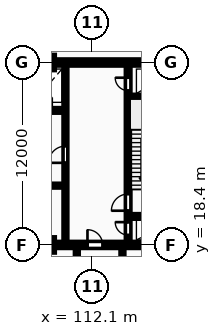
"""IFC4 building model, lengths in metres.
Left out: names, types, materials, properties, quantities, classifications, styles, units other than length and angle.
Written with IfcOpenShell. Run it as: python <this file> out.ifc"""

import sys

from ifc_helpers import new_model, si_unit, direction, frame, frame_2d, origin, origin_2d, place, context, subcontext, project, spatial, rectangle, extrude, element, fill, save


model = new_model("IFC4")
c1 = context("Model", 3, precision=1e-05, world=origin(), true_north=direction((0.0, 1.0)))
c2 = subcontext(c1, "Body", "Model", "MODEL_VIEW")
j1 = project(units=[si_unit("LENGTHUNIT", "METRE"), si_unit("PLANEANGLEUNIT", "RADIAN")], contexts=[c1])
p1 = place(None, origin())
s1 = spatial("IfcSite", under=j1, at=p1, CompositionType="ELEMENT")
p2 = place(p1, origin())
s2 = spatial("IfcBuilding", under=s1, at=p2, CompositionType="ELEMENT")
p3 = place(p2, origin())
s3 = spatial("IfcBuildingStorey", under=s2, at=p3, CompositionType="ELEMENT", Elevation=0.0)
for number, where, z_axis, x_axis in (
    (1, (109.1, 18.4, 0.0), (0.0, 0.0, 1.0), (1.0, 0.0, 0.0)),
    (2, (109.1, 30.4, 0.0), (0.0, 0.0, 1.0), (1.0, 0.0, 0.0)),
):
    element("IfcColumn", number, at=place(p3, frame(where, z_axis=z_axis, x_axis=x_axis)), inside=s3, PredefinedType="COLUMN", context=c2, shape_type="SweptSolid", body=[
        extrude(rectangle(XDim=1.05, YDim=0.95, at=origin_2d()), origin(), (0.0, 0.0, 1.0), 5.4),
    ])
p4 = place(p3, frame((81.925, 30.4, 0.0), z_axis=(0.0, 0.0, 1.0), x_axis=(1.0, 0.0, 0.0)))
e3 = element("IfcWall", 3, at=p4, inside=s3, PredefinedType="SHEAR", context=c2, shape_type="SweptSolid", body=[
    extrude(rectangle(XDim=36.265, YDim=0.35, at=frame_2d((18.132, 0.0))), origin(), (0.0, 0.0, 1.0), 5.4),
])
p5 = place(p3, frame((81.925, 18.4, 0.0), z_axis=(0.0, 0.0, 1.0), x_axis=(1.0, 0.0, 0.0)))
e4 = element("IfcWall", 4, at=p5, inside=s3, PredefinedType="SHEAR", context=c2, shape_type="SweptSolid", body=[
    extrude(rectangle(XDim=36.265, YDim=0.35, at=frame_2d((18.132, 0.0))), origin(), (0.0, 0.0, 1.0), 5.4),
])
p6 = place(p5, frame((5.675, 0.0, 0.0)))
e5 = element("IfcOpeningElement", 5, at=p6, cuts=e4, PredefinedType="OPENING", context=c2, shape_type="SweptSolid", body=[
    extrude(rectangle(XDim=1.0, YDim=2.15, at=frame_2d((0.5, 1.075))), frame((0.0, 0.185, 0.0), z_axis=(0.0, -1.0, 0.0), x_axis=(1.0, 0.0, 0.0)), (0.0, 0.0, 1.0), 0.37),
])
p7 = place(p5, frame((21.925, 0.0, 0.0)))
e6 = element("IfcOpeningElement", 6, at=p7, cuts=e4, PredefinedType="OPENING", context=c2, shape_type="SweptSolid", body=[
    extrude(rectangle(XDim=1.5, YDim=2.2, at=frame_2d((0.75, 1.1))), frame((0.0, 0.185, 0.0), z_axis=(0.0, -1.0, 0.0), x_axis=(1.0, 0.0, 0.0)), (0.0, 0.0, 1.0), 0.37),
])
p8 = place(p5, frame((29.875, 0.0, 0.0)))
e7 = element("IfcOpeningElement", 7, at=p8, cuts=e4, PredefinedType="OPENING", context=c2, shape_type="SweptSolid", body=[
    extrude(rectangle(XDim=1.0, YDim=2.15, at=frame_2d((0.5, 1.075))), frame((0.0, 0.185, 0.0), z_axis=(0.0, -1.0, 0.0), x_axis=(1.0, 0.0, 0.0)), (0.0, 0.0, 1.0), 0.37),
])
p9 = place(p3, frame((99.68, 27.25, 0.0), z_axis=(0.0, 0.0, 1.0), x_axis=(1.0, 0.0, 0.0)))
e8 = element("IfcWall", 8, at=p9, inside=s3, PredefinedType="SHEAR", context=c2, shape_type="SweptSolid", body=[
    extrude(rectangle(XDim=10.54, YDim=0.25, at=frame_2d((5.27, 0.0))), origin(), (0.0, 0.0, 1.0), 5.4),
])
p10 = place(p9, frame((0.76, 0.0, 0.0)))
e9 = element("IfcOpeningElement", 9, at=p10, cuts=e8, PredefinedType="OPENING", context=c2, shape_type="SweptSolid", body=[
    extrude(rectangle(XDim=1.12, YDim=2.12, at=frame_2d((0.56, 1.06))), frame((0.0, 0.135, 0.0), z_axis=(0.0, -1.0, 0.0), x_axis=(1.0, 0.0, 0.0)), (0.0, 0.0, 1.0), 0.27),
])
p11 = place(p9, frame((3.56, 0.0, 0.0)))
e10 = element("IfcOpeningElement", 10, at=p11, cuts=e8, PredefinedType="OPENING", context=c2, shape_type="SweptSolid", body=[
    extrude(rectangle(XDim=1.12, YDim=2.12, at=frame_2d((0.56, 1.06))), frame((0.0, 0.135, 0.0), z_axis=(0.0, -1.0, 0.0), x_axis=(1.0, 0.0, 0.0)), (0.0, 0.0, 1.0), 0.27),
])
p12 = place(p9, frame((6.36, 0.0, 0.0)))
e11 = element("IfcOpeningElement", 11, at=p12, cuts=e8, PredefinedType="OPENING", context=c2, shape_type="SweptSolid", body=[
    extrude(rectangle(XDim=1.12, YDim=2.12, at=frame_2d((0.56, 1.06))), frame((0.0, 0.135, 0.0), z_axis=(0.0, -1.0, 0.0), x_axis=(1.0, 0.0, 0.0)), (0.0, 0.0, 1.0), 0.27),
])
p13 = place(p9, frame((8.92, 0.0, 0.0)))
e12 = element("IfcOpeningElement", 12, at=p13, cuts=e8, PredefinedType="OPENING", context=c2, shape_type="SweptSolid", body=[
    extrude(rectangle(XDim=0.85, YDim=2.05, at=frame_2d((0.425, 1.025))), frame((0.0, 0.135, 0.0), z_axis=(0.0, -1.0, 0.0), x_axis=(1.0, 0.0, 0.0)), (0.0, 0.0, 1.0), 0.27),
])
p14 = place(p3, frame((91.08, 22.3, 0.0), z_axis=(0.0, 0.0, 1.0), x_axis=(1.0, 0.0, 0.0)))
e13 = element("IfcWall", 13, at=p14, inside=s3, PredefinedType="PARTITIONING", context=c2, shape_type="SweptSolid", body=[
    extrude(rectangle(XDim=19.14, YDim=0.2, at=frame_2d((9.57, 0.0))), origin(), (0.0, 0.0, 1.0), 5.1),
])
p15 = place(p14, frame((1.15, 0.0, 0.0)))
e14 = element("IfcOpeningElement", 14, at=p15, cuts=e13, PredefinedType="OPENING", context=c2, shape_type="SweptSolid", body=[
    extrude(rectangle(XDim=0.85, YDim=2.05, at=frame_2d((0.425, 1.025))), frame((0.0, 0.11, 0.0), z_axis=(0.0, -1.0, 0.0), x_axis=(1.0, 0.0, 0.0)), (0.0, 0.0, 1.0), 0.22),
])
p16 = place(p14, frame((3.2, 0.0, 0.0)))
e15 = element("IfcOpeningElement", 15, at=p16, cuts=e13, PredefinedType="OPENING", context=c2, shape_type="SweptSolid", body=[
    extrude(rectangle(XDim=0.85, YDim=2.05, at=frame_2d((0.425, 1.025))), frame((0.0, 0.11, 0.0), z_axis=(0.0, -1.0, 0.0), x_axis=(1.0, 0.0, 0.0)), (0.0, 0.0, 1.0), 0.22),
])
p17 = place(p14, frame((12.72, 0.0, 0.0)))
e16 = element("IfcOpeningElement", 16, at=p17, cuts=e13, PredefinedType="OPENING", context=c2, shape_type="SweptSolid", body=[
    extrude(rectangle(XDim=1.5, YDim=2.2, at=frame_2d((0.75, 1.1))), frame((0.0, 0.11, 0.0), z_axis=(0.0, -1.0, 0.0), x_axis=(1.0, 0.0, 0.0)), (0.0, 0.0, 1.0), 0.22),
])
p18 = place(p14, frame((5.52, 0.0, 0.0)))
e17 = element("IfcOpeningElement", 17, at=p18, cuts=e13, PredefinedType="OPENING", context=c2, shape_type="SweptSolid", body=[
    extrude(rectangle(XDim=0.88, YDim=2.06, at=frame_2d((0.44, 1.03))), frame((0.0, 0.11, 0.0), z_axis=(0.0, -1.0, 0.0), x_axis=(1.0, 0.0, 0.0)), (0.0, 0.0, 1.0), 0.22),
])
p19 = place(p14, frame((7.67, 0.0, 0.0)))
e18 = element("IfcOpeningElement", 18, at=p19, cuts=e13, PredefinedType="OPENING", context=c2, shape_type="SweptSolid", body=[
    extrude(rectangle(XDim=0.88, YDim=2.06, at=frame_2d((0.44, 1.03))), frame((0.0, 0.11, 0.0), z_axis=(0.0, -1.0, 0.0), x_axis=(1.0, 0.0, 0.0)), (0.0, 0.0, 1.0), 0.22),
])
p20 = place(p14, frame((10.27, 0.0, 0.0)))
e19 = element("IfcOpeningElement", 19, at=p20, cuts=e13, PredefinedType="OPENING", context=c2, shape_type="SweptSolid", body=[
    extrude(rectangle(XDim=0.85, YDim=2.05, at=frame_2d((0.425, 1.025))), frame((0.0, 0.11, 0.0), z_axis=(0.0, -1.0, 0.0), x_axis=(1.0, 0.0, 0.0)), (0.0, 0.0, 1.0), 0.22),
])
p21 = place(p14, frame((15.92, 0.0, 0.0)))
e20 = element("IfcOpeningElement", 20, at=p21, cuts=e13, PredefinedType="OPENING", context=c2, shape_type="SweptSolid", body=[
    extrude(rectangle(XDim=0.96, YDim=2.1, at=frame_2d((0.48, 1.05))), frame((0.0, 0.11, 0.0), z_axis=(0.0, -1.0, 0.0), x_axis=(1.0, 0.0, 0.0)), (0.0, 0.0, 1.0), 0.22),
])
p22 = place(p3, frame((110.35, 18.6, 0.0), z_axis=(0.0, 0.0, 1.0), x_axis=(0.0, 1.0, 0.0)))
e21 = element("IfcWall", 21, at=p22, inside=s3, PredefinedType="PARTITIONING", context=c2, shape_type="SweptSolid", body=[
    extrude(rectangle(XDim=11.6, YDim=0.2, at=frame_2d((5.8, 0.0))), origin(), (0.0, 0.0, 1.0), 5.1),
])
p23 = place(p22, frame((5.2, 0.0, 0.0)))
e22 = element("IfcOpeningElement", 22, at=p23, cuts=e21, PredefinedType="OPENING", context=c2, shape_type="SweptSolid", body=[
    extrude(rectangle(XDim=1.1, YDim=2.15, at=frame_2d((0.55, 1.075))), frame((0.0, 0.11, 0.0), z_axis=(0.0, -1.0, 0.0), x_axis=(1.0, 0.0, 0.0)), (0.0, 0.0, 1.0), 0.22),
])
p24 = place(p3, frame((114.475, 18.6, 0.0), z_axis=(0.0, 0.0, 1.0), x_axis=(0.0, 1.0, 0.0)))
e23 = element("IfcWall", 23, at=p24, inside=s3, PredefinedType="SHEAR", context=c2, shape_type="SweptSolid", body=[
    extrude(rectangle(XDim=11.6, YDim=0.25, at=frame_2d((5.8, 0.0))), origin(), (0.0, 0.0, 1.0), 5.4),
])
p25 = place(p24, frame((0.45, 0.0, 0.0)))
e24 = element("IfcOpeningElement", 24, at=p25, cuts=e23, PredefinedType="OPENING", context=c2, shape_type="SweptSolid", body=[
    extrude(rectangle(XDim=0.85, YDim=2.05, at=frame_2d((0.425, 1.025))), frame((0.0, 0.135, 0.0), z_axis=(0.0, -1.0, 0.0), x_axis=(1.0, 0.0, 0.0)), (0.0, 0.0, 1.0), 0.27),
])
p26 = place(p24, frame((2.05, 0.0, 0.0)))
e25 = element("IfcOpeningElement", 25, at=p26, cuts=e23, PredefinedType="OPENING", context=c2, shape_type="SweptSolid", body=[
    extrude(rectangle(XDim=1.1, YDim=2.1, at=frame_2d((0.55, 1.05))), frame((0.0, 0.135, 0.0), z_axis=(0.0, -1.0, 0.0), x_axis=(1.0, 0.0, 0.0)), (0.0, 0.0, 1.0), 0.27),
])
p27 = place(p24, frame((9.95, 0.0, 0.0)))
e26 = element("IfcOpeningElement", 26, at=p27, cuts=e23, PredefinedType="OPENING", context=c2, shape_type="SweptSolid", body=[
    extrude(rectangle(XDim=0.85, YDim=2.05, at=frame_2d((0.425, 1.025))), frame((0.0, 0.135, 0.0), z_axis=(0.0, -1.0, 0.0), x_axis=(1.0, 0.0, 0.0)), (0.0, 0.0, 1.0), 0.27),
])
for number, where, z_axis, x_axis in (
    (27, (114.6, 20.275, 0.0), (0.0, 0.0, 1.0), (1.0, 0.0, 0.0)),
    (28, (114.6, 28.125, 0.0), (0.0, 0.0, 1.0), (1.0, 0.0, 0.0)),
):
    element("IfcWall", number, at=place(p3, frame(where, z_axis=z_axis, x_axis=x_axis)), inside=s3, PredefinedType="SHEAR", context=c2, shape_type="SweptSolid", body=[
        extrude(rectangle(XDim=3.24, YDim=0.25, at=frame_2d((1.62, 0.0))), origin(), (0.0, 0.0, 1.0), 5.4),
    ])
p28 = place(p3, frame((111.1, -26.2, 0.0), z_axis=(0.0, 0.0, 1.0), x_axis=(0.0, 1.0, 0.0)))
e29 = element("IfcWall", 29, at=p28, inside=s3, PredefinedType="PARTITIONING", context=c2, shape_type="SweptSolid", body=[
    extrude(rectangle(XDim=44.35, YDim=0.2, at=frame_2d((22.175, 0.0))), origin(), (0.0, 0.0, 1.0), 5.1),
])
p29 = place(p28, frame((16.0, 0.0, 0.0)))
e30 = element("IfcOpeningElement", 30, at=p29, cuts=e29, PredefinedType="OPENING", context=c2, shape_type="SweptSolid", body=[
    extrude(rectangle(XDim=1.1, YDim=2.1, at=frame_2d((0.55, 1.05))), frame((0.0, 0.11, 0.0), z_axis=(0.0, -1.0, 0.0), x_axis=(1.0, 0.0, 0.0)), (0.0, 0.0, 1.0), 0.22),
])
p30 = place(p3, frame((114.1, -26.2, 0.0), z_axis=(0.0, 0.0, 1.0), x_axis=(0.0, 1.0, 0.0)))
e31 = element("IfcWall", 31, at=p30, inside=s3, PredefinedType="PARTITIONING", context=c2, shape_type="SweptSolid", body=[
    extrude(rectangle(XDim=44.35, YDim=0.2, at=frame_2d((22.175, 0.0))), origin(), (0.0, 0.0, 1.0), 5.1),
])
p31 = place(p8, origin())
e32 = element("IfcDoor", 32, at=p31, inside=s3, OperationType="SINGLE_SWING_LEFT", PredefinedType="DOOR", context=c2, shape_type="SweptSolid", body=[
    extrude(rectangle(XDim=1.0, YDim=2.15, at=frame_2d((0.5, 1.075))), frame((0.0, 0.025, 0.0), z_axis=(0.0, -1.0, 0.0), x_axis=(1.0, 0.0, 0.0)), (0.0, 0.0, 1.0), 0.05),
])
fill(e7, e32)
p32 = place(p23, origin())
e33 = element("IfcDoor", 33, at=p32, inside=s3, OperationType="SINGLE_SWING_LEFT", PredefinedType="DOOR", context=c2, shape_type="SweptSolid", body=[
    extrude(rectangle(XDim=1.1, YDim=2.15, at=frame_2d((0.55, 1.075))), frame((0.0, 0.025, 0.0), z_axis=(0.0, -1.0, 0.0), x_axis=(1.0, 0.0, 0.0)), (0.0, 0.0, 1.0), 0.05),
])
fill(e22, e33)
p33 = place(p25, origin())
e34 = element("IfcDoor", 34, at=p33, inside=s3, OperationType="SINGLE_SWING_RIGHT", PredefinedType="DOOR", context=c2, shape_type="SweptSolid", body=[
    extrude(rectangle(XDim=0.85, YDim=2.05, at=frame_2d((0.425, 1.025))), frame((0.0, 0.025, 0.0), z_axis=(0.0, -1.0, 0.0), x_axis=(1.0, 0.0, 0.0)), (0.0, 0.0, 1.0), 0.05),
])
fill(e24, e34)
p34 = place(p26, origin())
e35 = element("IfcDoor", 35, at=p34, inside=s3, OperationType="SINGLE_SWING_LEFT", PredefinedType="DOOR", context=c2, shape_type="SweptSolid", body=[
    extrude(rectangle(XDim=1.1, YDim=2.1, at=frame_2d((0.55, 1.05))), frame((0.0, 0.025, 0.0), z_axis=(0.0, -1.0, 0.0), x_axis=(1.0, 0.0, 0.0)), (0.0, 0.0, 1.0), 0.05),
])
fill(e25, e35)
p35 = place(p27, origin())
e36 = element("IfcDoor", 36, at=p35, inside=s3, OperationType="SINGLE_SWING_RIGHT", PredefinedType="DOOR", context=c2, shape_type="SweptSolid", body=[
    extrude(rectangle(XDim=0.85, YDim=2.05, at=frame_2d((0.425, 1.025))), frame((0.0, 0.025, 0.0), z_axis=(0.0, -1.0, 0.0), x_axis=(1.0, 0.0, 0.0)), (0.0, 0.0, 1.0), 0.05),
])
fill(e26, e36)
save(model, sys.argv[1])
